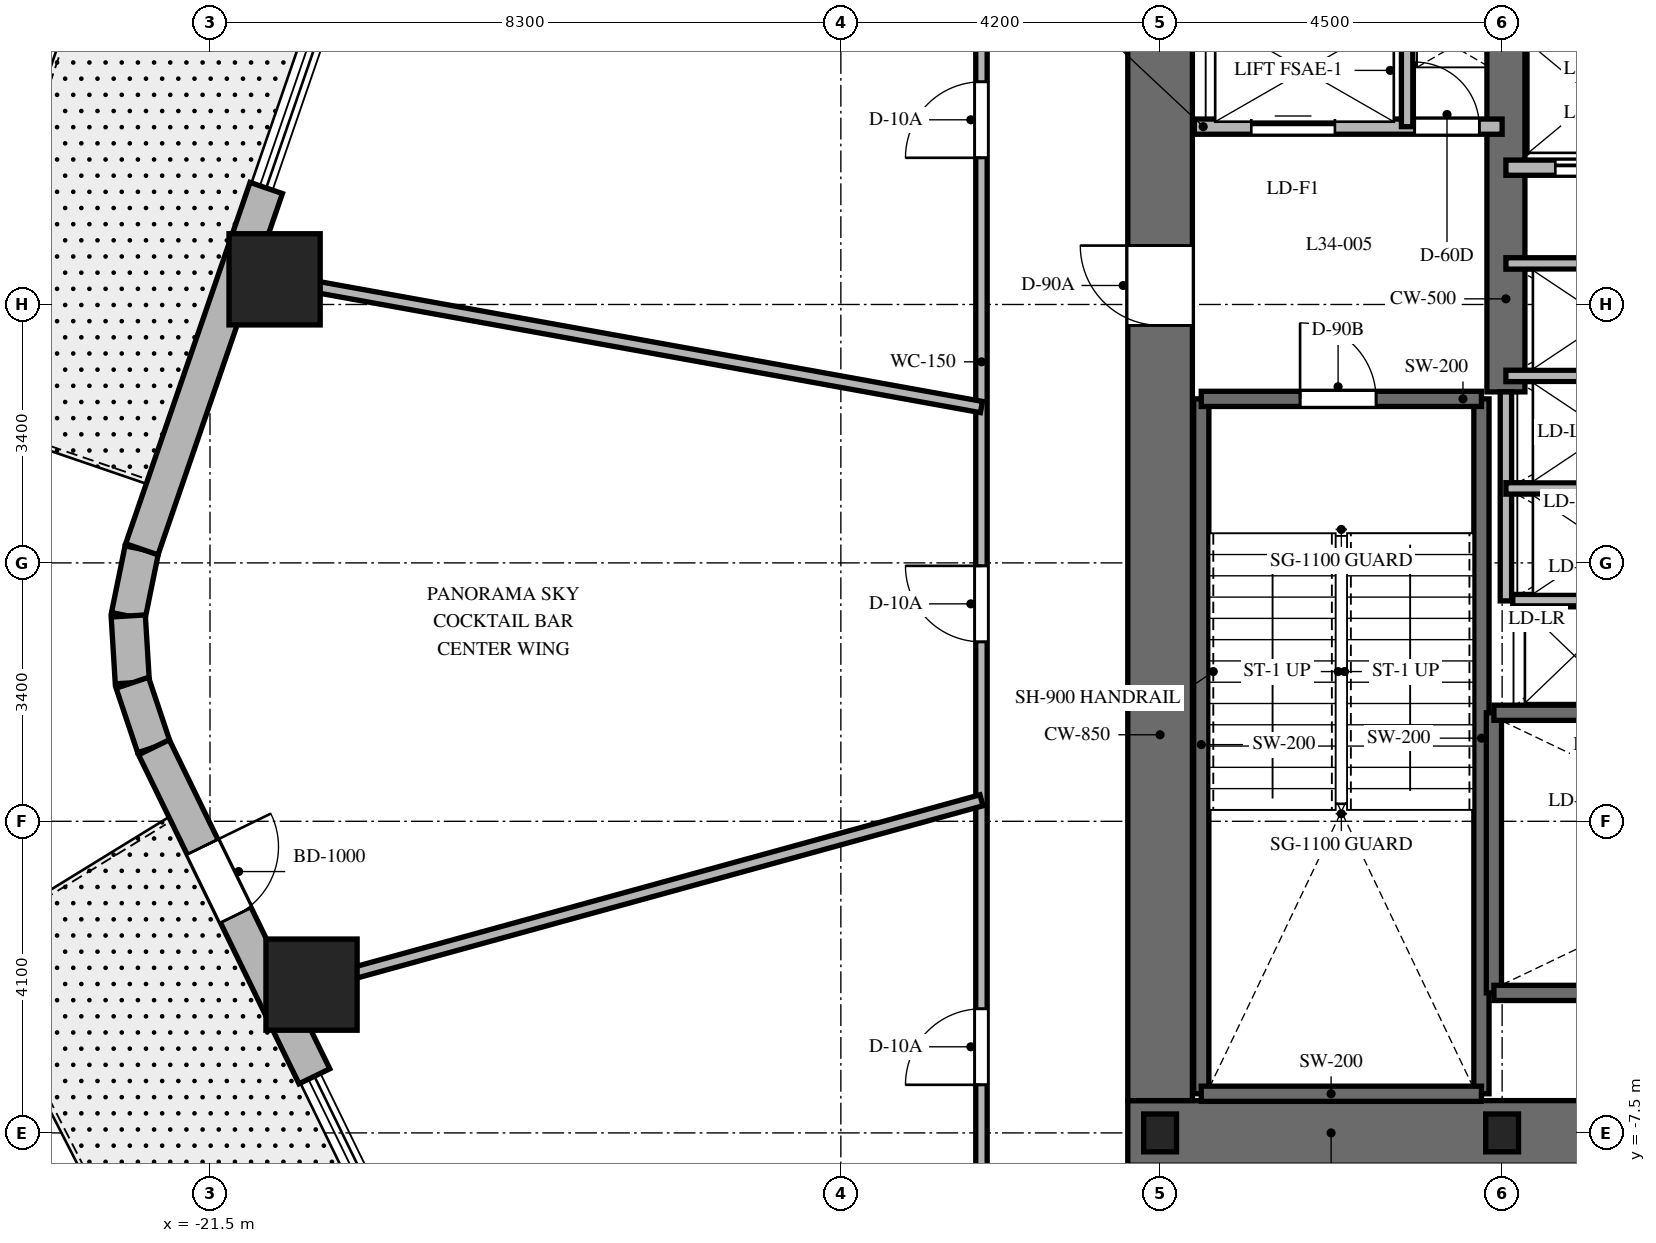
"""IFC4 building model, lengths in metres.
Left out: names, types, materials, properties, quantities, classifications, styles, units other than length and angle.
Written with IfcOpenShell. Run it as: python <this file> out.ifc"""

import sys

from ifc_helpers import new_model, si_unit, direction, frame, frame_2d, origin, origin_2d, place, context, subcontext, project, spatial, rectangle, i_section, extrude, element, fill, save


model = new_model("IFC4")
c1 = context("Model", 3, precision=1e-05, world=origin(), true_north=direction((0.0, 1.0)))
c2 = subcontext(c1, "Body", "Model", "MODEL_VIEW")
j1 = project(units=[si_unit("LENGTHUNIT", "METRE"), si_unit("PLANEANGLEUNIT", "RADIAN")], contexts=[c1])
p1 = place(None, origin())
s1 = spatial("IfcSite", under=j1, at=p1, CompositionType="ELEMENT")
p2 = place(p1, origin())
s2 = spatial("IfcBuilding", under=s1, at=p2, CompositionType="ELEMENT")
p3 = place(p2, frame((0.0, 0.0, 139.5)))
s3 = spatial("IfcBuildingStorey", under=s2, at=p3, CompositionType="ELEMENT", Elevation=139.5)
p4 = place(p3, frame((-9.425, -7.5, 0.0), z_axis=(0.0, 0.0, 1.0), x_axis=(1.0, 0.0, 0.0)))
e1 = element("IfcWall", 1, at=p4, inside=s3, PredefinedType="SHEAR", context=c2, shape_type="SweptSolid", body=[
    extrude(rectangle(XDim=18.85, YDim=0.85, at=frame_2d((9.425, 0.0))), origin(), (0.0, 0.0, 1.0), 4.8),
])
p5 = place(p4, frame((9.475, 0.0, 0.0)))
e2 = element("IfcOpeningElement", 2, at=p5, cuts=e1, PredefinedType="OPENING", context=c2, shape_type="SweptSolid", body=[
    extrude(rectangle(XDim=1.0, YDim=2.15, at=frame_2d((0.5, 1.075))), frame((0.0, 0.435, 0.0), z_axis=(0.0, -1.0, 0.0), x_axis=(1.0, 0.0, 0.0)), (0.0, 0.0, 1.0), 0.87),
])
p6 = place(p3, frame((-9.0, -7.075, 0.0), z_axis=(0.0, 0.0, 1.0), x_axis=(0.0, 1.0, 0.0)))
e3 = element("IfcWall", 3, at=p6, inside=s3, PredefinedType="SHEAR", context=c2, shape_type="SweptSolid", body=[
    extrude(rectangle(XDim=14.15, YDim=0.85, at=frame_2d((7.075, 0.0))), origin(), (0.0, 0.0, 1.0), 4.8),
])
p7 = place(p6, frame((10.2, 0.0, 0.0)))
e4 = element("IfcOpeningElement", 4, at=p7, cuts=e3, PredefinedType="OPENING", context=c2, shape_type="SweptSolid", body=[
    extrude(rectangle(XDim=1.05, YDim=2.15, at=frame_2d((0.525, 1.075))), frame((0.0, 0.435, 0.0), z_axis=(0.0, -1.0, 0.0), x_axis=(1.0, 0.0, 0.0)), (0.0, 0.0, 1.0), 0.87),
])
p8 = place(p3, frame((-4.45, 2.25, 0.0), z_axis=(0.0, 0.0, 1.0), x_axis=(0.0, 1.0, 0.0)))
e5 = element("IfcWall", 5, at=p8, inside=s3, PredefinedType="SHEAR", context=c2, shape_type="SweptSolid", body=[
    extrude(rectangle(XDim=4.825, YDim=0.5, at=frame_2d((2.413, 0.0))), origin(), (0.0, 0.0, 1.0), 4.8),
])
for number, where, z_axis, x_axis in (
    (6, (-8.458, -6.985, 0.0), (0.0, 0.0, 1.0), (0.0, 1.0, 0.0)),
    (7, (-4.772, -6.985, 0.0), (0.0, 0.0, 1.0), (0.0, 1.0, 0.0)),
):
    element("IfcWall", number, at=place(p3, frame(where, z_axis=z_axis, x_axis=x_axis)), inside=s3, PredefinedType="SHEAR", context=c2, shape_type="SweptSolid", body=[
        extrude(rectangle(XDim=9.143, YDim=0.2, at=frame_2d((4.572, 0.0))), origin(), (0.0, 0.0, 1.0), 4.8),
    ])
p9 = place(p3, frame((-8.458, -6.985, 0.0), z_axis=(0.0, 0.0, 1.0), x_axis=(1.0, 0.0, 0.0)))
e8 = element("IfcWall", 8, at=p9, inside=s3, PredefinedType="SHEAR", context=c2, shape_type="SweptSolid", body=[
    extrude(rectangle(XDim=3.686, YDim=0.2, at=frame_2d((1.843, 0.0))), origin(), (0.0, 0.0, 1.0), 4.8),
])
p10 = place(p3, frame((-8.458, 2.158, 0.0), z_axis=(0.0, 0.0, 1.0), x_axis=(1.0, 0.0, 0.0)))
e9 = element("IfcWall", 9, at=p10, inside=s3, PredefinedType="SHEAR", context=c2, shape_type="SweptSolid", body=[
    extrude(rectangle(XDim=3.686, YDim=0.2, at=frame_2d((1.843, 0.0))), origin(), (0.0, 0.0, 1.0), 4.8),
])
p11 = place(p10, frame((1.3, 0.0, 0.0)))
e10 = element("IfcOpeningElement", 10, at=p11, cuts=e9, PredefinedType="OPENING", context=c2, shape_type="SweptSolid", body=[
    extrude(rectangle(XDim=1.0, YDim=2.15, at=frame_2d((0.5, 1.075))), frame((0.0, 0.11, 0.0), z_axis=(0.0, -1.0, 0.0), x_axis=(1.0, 0.0, 0.0)), (0.0, 0.0, 1.0), 0.22),
])
p12 = place(p3, frame((-4.608, -5.658, 0.0), z_axis=(0.0, 0.0, 1.0), x_axis=(0.0, 1.0, 0.0)))
e11 = element("IfcWall", 11, at=p12, inside=s3, PredefinedType="SHEAR", context=c2, shape_type="SweptSolid", body=[
    extrude(rectangle(XDim=3.686, YDim=0.2, at=frame_2d((1.843, 0.0))), origin(), (0.0, 0.0, 1.0), 4.8),
])
p13 = place(p3, frame((-4.608, -5.658, 0.0), z_axis=(0.0, 0.0, 1.0), x_axis=(1.0, 0.0, 0.0)))
e12 = element("IfcWall", 12, at=p13, inside=s3, PredefinedType="SHEAR", context=c2, shape_type="SweptSolid", body=[
    extrude(rectangle(XDim=9.166, YDim=0.2, at=frame_2d((4.583, 0.0))), origin(), (0.0, 0.0, 1.0), 4.8),
])
p14 = place(p13, frame((7.45, 0.0, 0.0)))
e13 = element("IfcOpeningElement", 13, at=p14, cuts=e12, PredefinedType="OPENING", context=c2, shape_type="SweptSolid", body=[
    extrude(rectangle(XDim=1.0, YDim=2.15, at=frame_2d((0.5, 1.075))), frame((0.0, 0.11, 0.0), z_axis=(0.0, -1.0, 0.0), x_axis=(1.0, 0.0, 0.0)), (0.0, 0.0, 1.0), 0.22),
])
p15 = place(p3, frame((-4.608, -1.972, 0.0), z_axis=(0.0, 0.0, 1.0), x_axis=(1.0, 0.0, 0.0)))
e14 = element("IfcWall", 14, at=p15, inside=s3, PredefinedType="SHEAR", context=c2, shape_type="SweptSolid", body=[
    extrude(rectangle(XDim=9.166, YDim=0.2, at=frame_2d((4.583, 0.0))), origin(), (0.0, 0.0, 1.0), 4.8),
])
for number, where, z_axis, x_axis in (
    (15, (-9.0, -7.5, 0.0), (0.0, 0.0, 1.0), (1.0, 0.0, 0.0)),
    (16, (-4.5, -7.5, 0.0), (0.0, 0.0, 1.0), (1.0, 0.0, 0.0)),
):
    element("IfcColumn", number, at=place(p3, frame(where, z_axis=z_axis, x_axis=x_axis)), inside=s3, PredefinedType="COLUMN", context=c2, shape_type="SweptSolid", body=[
        extrude(i_section(OverallWidth=0.432, OverallDepth=0.498, WebThickness=0.056, FlangeThickness=0.089, at=origin_2d()), origin(), (0.0, 0.0, 1.0), 4.8),
    ])
for number, where, z_axis, x_axis in (
    (17, (-20.65, 3.731, 0.0), (0.0, 0.0, 1.0), (1.0, 0.0, 0.0)),
    (18, (-20.164, -5.549, 0.0), (0.0, 0.0, 1.0), (1.0, 0.0, 0.0)),
):
    element("IfcColumn", number, at=place(p3, frame(where, z_axis=z_axis, x_axis=x_axis)), inside=s3, PredefinedType="COLUMN", context=c2, shape_type="SweptSolid", body=[
        extrude(rectangle(XDim=1.2, YDim=1.2, at=origin_2d()), origin(), (0.0, 0.0, 1.0), 4.8),
    ])
p16 = place(p3, frame((-22.397, 0.179, 0.0), z_axis=(0.0, 0.0, 1.0), x_axis=(-0.199313589404, -0.979935759669, 0.0)))
e19 = element("IfcWall", 19, at=p16, inside=s3, PredefinedType="SOLIDWALL", context=c2, shape_type="SweptSolid", body=[
    extrude(rectangle(XDim=0.896, YDim=0.45, at=frame_2d((0.448, 0.0))), origin(), (0.0, 0.0, 1.0), 4.5),
])
p17 = place(p3, frame((-22.575, -0.698, 0.0), z_axis=(0.0, 0.0, 1.0), x_axis=(0.060980441946, -0.998138961117, 0.0)))
e20 = element("IfcWall", 20, at=p17, inside=s3, PredefinedType="SOLIDWALL", context=c2, shape_type="SweptSolid", body=[
    extrude(rectangle(XDim=0.881, YDim=0.45, at=frame_2d((0.44, 0.0))), origin(), (0.0, 0.0, 1.0), 4.5),
])
p18 = place(p3, frame((-22.522, -1.577, 0.0), z_axis=(0.0, 0.0, 1.0), x_axis=(0.317372694837, -0.948300887151, 0.0)))
e21 = element("IfcWall", 21, at=p18, inside=s3, PredefinedType="SOLIDWALL", context=c2, shape_type="SweptSolid", body=[
    extrude(rectangle(XDim=0.896, YDim=0.45, at=frame_2d((0.448, 0.0))), origin(), (0.0, 0.0, 1.0), 4.5),
])
p19 = place(p3, frame((-20.76, 4.933, 0.0), z_axis=(0.0, 0.0, 1.0), x_axis=(-0.325594073587, -0.94550965053, 0.0)))
e22 = element("IfcWall", 22, at=p19, inside=s3, PredefinedType="SOLIDWALL", context=c2, shape_type="SweptSolid", body=[
    extrude(rectangle(XDim=5.028, YDim=0.45, at=frame_2d((2.514, 0.0))), origin(), (0.0, 0.0, 1.0), 4.5),
])
p20 = place(p3, frame((-22.238, -2.427, 0.0), z_axis=(0.0, 0.0, 1.0), x_axis=(0.438370693728, -0.898794267272, 0.0)))
e23 = element("IfcWall", 23, at=p20, inside=s3, PredefinedType="SOLIDWALL", context=c2, shape_type="SweptSolid", body=[
    extrude(rectangle(XDim=4.816, YDim=0.45, at=frame_2d((2.408, 0.0))), origin(), (0.0, 0.0, 1.0), 4.5),
])
p21 = place(p20, frame((1.458, 0.0, 0.0)))
e24 = element("IfcOpeningElement", 24, at=p21, cuts=e23, PredefinedType="OPENING", context=c2, shape_type="SweptSolid", body=[
    extrude(rectangle(XDim=1.0, YDim=2.15, at=frame_2d((0.5, 1.075))), frame((0.0, 0.235, 0.0), z_axis=(0.0, -1.0, 0.0), x_axis=(1.0, 0.0, 0.0)), (0.0, 0.0, 1.0), 0.47),
])
p22 = place(p3, frame((-8.55, 5.74, 0.0), z_axis=(0.0, 0.0, 1.0), x_axis=(1.0, 0.0, 0.0)))
e25 = element("IfcWall", 25, at=p22, inside=s3, PredefinedType="PARTITIONING", context=c2, shape_type="SweptSolid", body=[
    extrude(rectangle(XDim=4.05, YDim=0.2, at=frame_2d((2.025, 0.0))), origin(), (0.0, 0.0, 1.0), 4.5),
])
p23 = place(p22, frame((0.75, 0.0, 0.0)))
e26 = element("IfcOpeningElement", 26, at=p23, cuts=e25, PredefinedType="OPENING", context=c2, shape_type="SweptSolid", body=[
    extrude(rectangle(XDim=1.1, YDim=2.2, at=frame_2d((0.55, 1.1))), frame((0.0, 0.11, 0.0), z_axis=(0.0, -1.0, 0.0), x_axis=(1.0, 0.0, 0.0)), (0.0, 0.0, 1.0), 0.22),
])
p24 = place(p22, frame((2.9, 0.0, 0.0)))
e27 = element("IfcOpeningElement", 27, at=p24, cuts=e25, PredefinedType="OPENING", context=c2, shape_type="SweptSolid", body=[
    extrude(rectangle(XDim=0.85, YDim=2.03, at=frame_2d((0.425, 1.015))), frame((0.0, 0.11, 0.0), z_axis=(0.0, -1.0, 0.0), x_axis=(1.0, 0.0, 0.0)), (0.0, 0.0, 1.0), 0.22),
])
p25 = place(p3, frame((-5.75, 5.74, 0.0), z_axis=(0.0, 0.0, 1.0), x_axis=(0.0, 1.0, 0.0)))
e28 = element("IfcWall", 28, at=p25, inside=s3, PredefinedType="PARTITIONING", context=c2, shape_type="SweptSolid", body=[
    extrude(rectangle(XDim=1.41, YDim=0.15, at=frame_2d((0.705, 0.0))), origin(), (0.0, 0.0, 1.0), 4.5),
])
p26 = place(p3, frame((-4.45, 5.2, 0.0), z_axis=(0.0, 0.0, 1.0), x_axis=(1.0, 0.0, 0.0)))
e29 = element("IfcWall", 29, at=p26, inside=s3, PredefinedType="PARTITIONING", context=c2, shape_type="SweptSolid", body=[
    extrude(rectangle(XDim=4.5, YDim=0.2, at=frame_2d((2.25, 0.0))), origin(), (0.0, 0.0, 1.0), 4.5),
])
p27 = place(p26, frame((0.65, 0.0, 0.0)))
e30 = element("IfcOpeningElement", 30, at=p27, cuts=e29, PredefinedType="OPENING", context=c2, shape_type="SweptSolid", body=[
    extrude(rectangle(XDim=1.0, YDim=2.2, at=frame_2d((0.5, 1.1))), frame((0.0, 0.11, 0.0), z_axis=(0.0, -1.0, 0.0), x_axis=(1.0, 0.0, 0.0)), (0.0, 0.0, 1.0), 0.22),
])
p28 = place(p26, frame((2.85, 0.0, 0.0)))
e31 = element("IfcOpeningElement", 31, at=p28, cuts=e29, PredefinedType="OPENING", context=c2, shape_type="SweptSolid", body=[
    extrude(rectangle(XDim=1.0, YDim=2.2, at=frame_2d((0.5, 1.1))), frame((0.0, 0.11, 0.0), z_axis=(0.0, -1.0, 0.0), x_axis=(1.0, 0.0, 0.0)), (0.0, 0.0, 1.0), 0.22),
])
p29 = place(p3, frame((-4.45, -0.5, 0.0), z_axis=(0.0, 0.0, 1.0), x_axis=(0.0, 1.0, 0.0)))
e32 = element("IfcWall", 32, at=p29, inside=s3, PredefinedType="PARTITIONING", context=c2, shape_type="SweptSolid", body=[
    extrude(rectangle(XDim=2.75, YDim=0.15, at=frame_2d((1.375, 0.0))), origin(), (0.0, 0.0, 1.0), 4.5),
])
for number, where, z_axis, x_axis in (
    (33, (-4.45, 3.94, 0.0), (0.0, 0.0, 1.0), (1.0, 0.0, 0.0)),
    (34, (-4.45, 0.98, 0.0), (0.0, 0.0, 1.0), (1.0, 0.0, 0.0)),
    (35, (-4.45, 2.46, 0.0), (0.0, 0.0, 1.0), (1.0, 0.0, 0.0)),
):
    element("IfcWall", number, at=place(p3, frame(where, z_axis=z_axis, x_axis=x_axis)), inside=s3, PredefinedType="PARTITIONING", context=c2, shape_type="SweptSolid", body=[
        extrude(rectangle(XDim=2.55, YDim=0.15, at=frame_2d((1.275, 0.0))), origin(), (0.0, 0.0, 1.0), 4.5),
    ])
p30 = place(p3, frame((-4.36, -0.49, 0.0), z_axis=(0.0, 0.0, 1.0), x_axis=(1.0, 0.0, 0.0)))
e36 = element("IfcWall", 36, at=p30, inside=s3, PredefinedType="PARTITIONING", context=c2, shape_type="SweptSolid", body=[
    extrude(rectangle(XDim=8.72, YDim=0.15, at=frame_2d((4.36, 0.0))), origin(), (0.0, 0.0, 1.0), 4.5),
])
p31 = place(p30, frame((3.16, 0.0, 0.0)))
e37 = element("IfcOpeningElement", 37, at=p31, cuts=e36, PredefinedType="OPENING", context=c2, shape_type="SweptSolid", body=[
    extrude(rectangle(XDim=0.85, YDim=2.03, at=frame_2d((0.425, 1.015))), frame((0.0, 0.085, 0.0), z_axis=(0.0, -1.0, 0.0), x_axis=(1.0, 0.0, 0.0)), (0.0, 0.0, 1.0), 0.17),
])
p32 = place(p30, frame((5.21, 0.0, 0.0)))
e38 = element("IfcOpeningElement", 38, at=p32, cuts=e36, PredefinedType="OPENING", context=c2, shape_type="SweptSolid", body=[
    extrude(rectangle(XDim=0.85, YDim=2.03, at=frame_2d((0.425, 1.015))), frame((0.0, 0.085, 0.0), z_axis=(0.0, -1.0, 0.0), x_axis=(1.0, 0.0, 0.0)), (0.0, 0.0, 1.0), 0.17),
])
p33 = place(p3, frame((-11.35, -9.85, 0.0), z_axis=(0.0, 0.0, 1.0), x_axis=(0.0, 1.0, 0.0)))
e39 = element("IfcWall", 39, at=p33, inside=s3, PredefinedType="PARTITIONING", context=c2, shape_type="SweptSolid", body=[
    extrude(rectangle(XDim=19.7, YDim=0.15, at=frame_2d((9.85, 0.0))), origin(), (0.0, 0.0, 1.0), 2.69),
])
p34 = place(p33, frame((15.18, 0.0, 0.0)))
e40 = element("IfcOpeningElement", 40, at=p34, cuts=e39, PredefinedType="OPENING", context=c2, shape_type="SweptSolid", body=[
    extrude(rectangle(XDim=1.0, YDim=2.03, at=frame_2d((0.5, 1.015))), frame((0.0, 0.085, 0.0), z_axis=(0.0, -1.0, 0.0), x_axis=(1.0, 0.0, 0.0)), (0.0, 0.0, 1.0), 0.17),
])
p35 = place(p33, frame((8.811, 0.0, 0.0)))
e41 = element("IfcOpeningElement", 41, at=p35, cuts=e39, PredefinedType="OPENING", context=c2, shape_type="SweptSolid", body=[
    extrude(rectangle(XDim=1.0, YDim=2.03, at=frame_2d((0.5, 1.015))), frame((0.0, 0.085, 0.0), z_axis=(0.0, -1.0, 0.0), x_axis=(1.0, 0.0, 0.0)), (0.0, 0.0, 1.0), 0.17),
])
p36 = place(p33, frame((2.983, 0.0, 0.0)))
e42 = element("IfcOpeningElement", 42, at=p36, cuts=e39, PredefinedType="OPENING", context=c2, shape_type="SweptSolid", body=[
    extrude(rectangle(XDim=1.0, YDim=2.03, at=frame_2d((0.5, 1.015))), frame((0.0, 0.085, 0.0), z_axis=(0.0, -1.0, 0.0), x_axis=(1.0, 0.0, 0.0)), (0.0, 0.0, 1.0), 0.17),
])
p37 = place(p3, frame((-11.35, 2.051, 0.0), z_axis=(0.0, 0.0, 1.0), x_axis=(-0.984068313063, 0.177790762484, 0.0)))
e43 = element("IfcWall", 43, at=p37, inside=s3, PredefinedType="PARTITIONING", context=c2, shape_type="SweptSolid", body=[
    extrude(rectangle(XDim=9.951, YDim=0.15, at=frame_2d((4.976, 0.0))), origin(), (0.0, 0.0, 1.0), 2.69),
])
p38 = place(p3, frame((-11.35, -3.123, 0.0), z_axis=(0.0, 0.0, 1.0), x_axis=(-0.964151983214, -0.265350623261, 0.0)))
e44 = element("IfcWall", 44, at=p38, inside=s3, PredefinedType="PARTITIONING", context=c2, shape_type="SweptSolid", body=[
    extrude(rectangle(XDim=9.645, YDim=0.15, at=frame_2d((4.823, 0.0))), origin(), (0.0, 0.0, 1.0), 2.69),
])
p39 = place(p21, origin())
e45 = element("IfcDoor", 45, at=p39, inside=s3, OperationType="SINGLE_SWING_LEFT", PredefinedType="DOOR", context=c2, shape_type="SweptSolid", body=[
    extrude(rectangle(XDim=1.0, YDim=2.15, at=frame_2d((0.5, 1.075))), frame((0.0, 0.025, 0.0), z_axis=(0.0, -1.0, 0.0), x_axis=(1.0, 0.0, 0.0)), (0.0, 0.0, 1.0), 0.05),
])
fill(e24, e45)
p40 = place(p11, origin())
e46 = element("IfcDoor", 46, at=p40, inside=s3, OperationType="SINGLE_SWING_LEFT", PredefinedType="DOOR", context=c2, shape_type="SweptSolid", body=[
    extrude(rectangle(XDim=1.0, YDim=2.15, at=frame_2d((0.5, 1.075))), frame((0.0, 0.025, 0.0), z_axis=(0.0, -1.0, 0.0), x_axis=(1.0, 0.0, 0.0)), (0.0, 0.0, 1.0), 0.05),
])
fill(e10, e46)
p41 = place(p7, origin())
e47 = element("IfcDoor", 47, at=p41, inside=s3, OperationType="SINGLE_SWING_RIGHT", PredefinedType="DOOR", context=c2, shape_type="SweptSolid", body=[
    extrude(rectangle(XDim=1.05, YDim=2.15, at=frame_2d((0.525, 1.075))), frame((0.0, 0.025, 0.0), z_axis=(0.0, -1.0, 0.0), x_axis=(1.0, 0.0, 0.0)), (0.0, 0.0, 1.0), 0.05),
])
fill(e4, e47)
p42 = place(p23, origin())
e48 = element("IfcDoor", 48, at=p42, inside=s3, OperationType="SLIDING_TO_LEFT", PredefinedType="DOOR", context=c2, shape_type="SweptSolid", body=[
    extrude(rectangle(XDim=1.1, YDim=2.2, at=frame_2d((0.55, 1.1))), frame((0.0, 0.025, 0.0), z_axis=(0.0, -1.0, 0.0), x_axis=(1.0, 0.0, 0.0)), (0.0, 0.0, 1.0), 0.05),
])
fill(e26, e48)
p43 = place(p24, origin())
e49 = element("IfcDoor", 49, at=p43, inside=s3, OperationType="SINGLE_SWING_LEFT", PredefinedType="DOOR", context=c2, shape_type="SweptSolid", body=[
    extrude(rectangle(XDim=0.85, YDim=2.03, at=frame_2d((0.425, 1.015))), frame((0.0, 0.025, 0.0), z_axis=(0.0, -1.0, 0.0), x_axis=(1.0, 0.0, 0.0)), (0.0, 0.0, 1.0), 0.05),
])
fill(e27, e49)
p44 = place(p27, origin())
e50 = element("IfcDoor", 50, at=p44, inside=s3, OperationType="SLIDING_TO_LEFT", PredefinedType="DOOR", context=c2, shape_type="SweptSolid", body=[
    extrude(rectangle(XDim=1.0, YDim=2.2, at=frame_2d((0.5, 1.1))), frame((0.0, 0.025, 0.0), z_axis=(0.0, -1.0, 0.0), x_axis=(1.0, 0.0, 0.0)), (0.0, 0.0, 1.0), 0.05),
])
fill(e30, e50)
p45 = place(p34, origin())
e51 = element("IfcDoor", 51, at=p45, inside=s3, OperationType="SINGLE_SWING_LEFT", PredefinedType="DOOR", context=c2, shape_type="SweptSolid", body=[
    extrude(rectangle(XDim=1.0, YDim=2.03, at=frame_2d((0.5, 1.015))), frame((0.0, 0.025, 0.0), z_axis=(0.0, -1.0, 0.0), x_axis=(1.0, 0.0, 0.0)), (0.0, 0.0, 1.0), 0.05),
])
fill(e40, e51)
p46 = place(p35, origin())
e52 = element("IfcDoor", 52, at=p46, inside=s3, OperationType="SINGLE_SWING_RIGHT", PredefinedType="DOOR", context=c2, shape_type="SweptSolid", body=[
    extrude(rectangle(XDim=1.0, YDim=2.03, at=frame_2d((0.5, 1.015))), frame((0.0, 0.025, 0.0), z_axis=(0.0, -1.0, 0.0), x_axis=(1.0, 0.0, 0.0)), (0.0, 0.0, 1.0), 0.05),
])
fill(e41, e52)
p47 = place(p36, origin())
e53 = element("IfcDoor", 53, at=p47, inside=s3, OperationType="SINGLE_SWING_LEFT", PredefinedType="DOOR", context=c2, shape_type="SweptSolid", body=[
    extrude(rectangle(XDim=1.0, YDim=2.03, at=frame_2d((0.5, 1.015))), frame((0.0, 0.025, 0.0), z_axis=(0.0, -1.0, 0.0), x_axis=(1.0, 0.0, 0.0)), (0.0, 0.0, 1.0), 0.05),
])
fill(e42, e53)
save(model, sys.argv[1])
